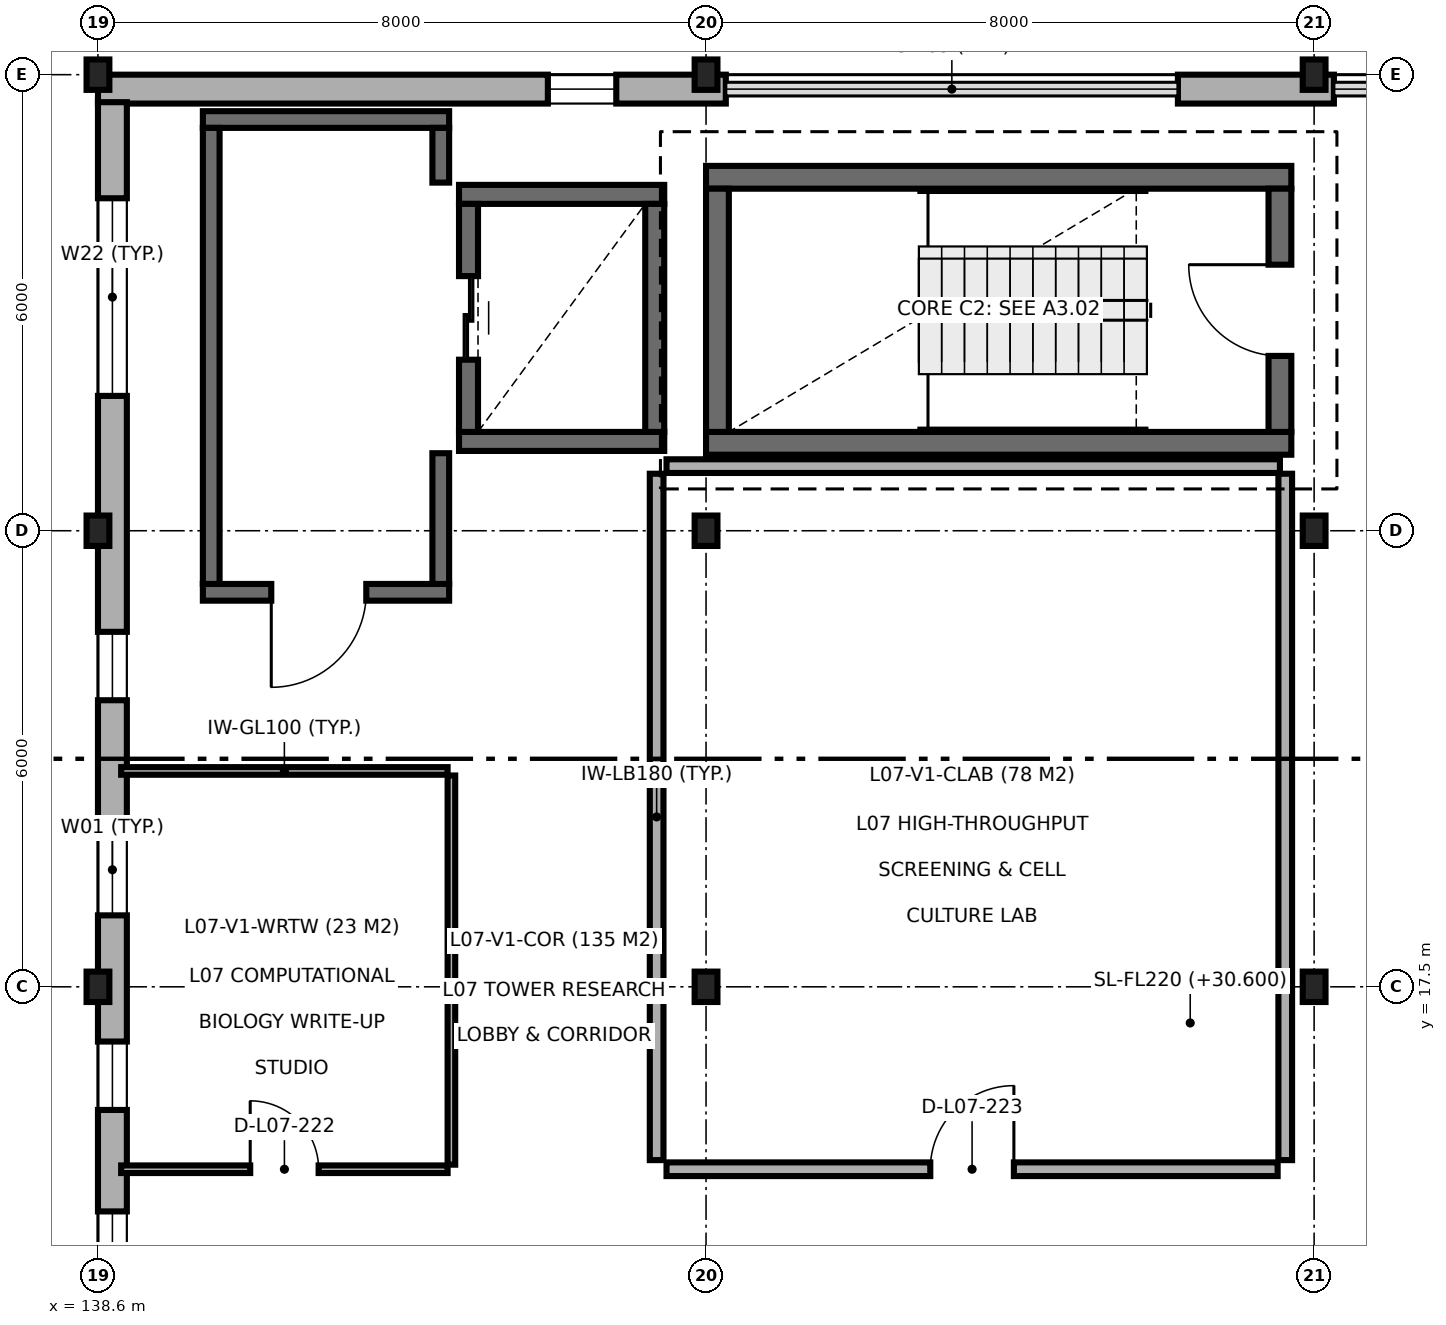
"""IFC4 building model, lengths in metres.
Left out: names, types, materials, properties, quantities, classifications, styles, units other than length and angle.
Written with IfcOpenShell. Run it as: python <this file> out.ifc"""

import sys

from ifc_helpers import new_model, si_unit, direction, frame, frame_2d, origin, origin_2d, place, context, subcontext, project, spatial, rectangle, i_section, extrude, element, fill, save


model = new_model("IFC4")
c1 = context("Model", 3, precision=1e-05, world=origin(), true_north=direction((0.0, 1.0)))
c2 = subcontext(c1, "Body", "Model", "MODEL_VIEW")
j1 = project(units=[si_unit("LENGTHUNIT", "METRE"), si_unit("PLANEANGLEUNIT", "RADIAN")], contexts=[c1])
p1 = place(None, origin())
s1 = spatial("IfcSite", under=j1, at=p1, CompositionType="ELEMENT")
p2 = place(p1, origin())
s2 = spatial("IfcBuilding", under=s1, at=p2, CompositionType="ELEMENT")
p3 = place(p2, frame((0.0, 0.0, 30.6)))
s3 = spatial("IfcBuildingStorey", under=s2, at=p3, CompositionType="ELEMENT", Elevation=30.6)
for number, where, z_axis, x_axis in (
    (1, (138.6, 17.5, 0.0), (0.0, 0.0, 1.0), (1.0, 0.0, 0.0)),
    (2, (138.6, 23.5, 0.0), (0.0, 0.0, 1.0), (1.0, 0.0, 0.0)),
    (3, (138.6, 29.5, 0.0), (0.0, 0.0, 1.0), (1.0, 0.0, 0.0)),
    (4, (146.6, 17.5, 0.0), (0.0, 0.0, 1.0), (1.0, 0.0, 0.0)),
    (5, (146.6, 23.5, 0.0), (0.0, 0.0, 1.0), (1.0, 0.0, 0.0)),
    (6, (146.6, 29.5, 0.0), (0.0, 0.0, 1.0), (1.0, 0.0, 0.0)),
    (7, (154.6, 17.5, 0.0), (0.0, 0.0, 1.0), (1.0, 0.0, 0.0)),
    (8, (154.6, 23.5, 0.0), (0.0, 0.0, 1.0), (1.0, 0.0, 0.0)),
    (9, (154.6, 29.5, 0.0), (0.0, 0.0, 1.0), (1.0, 0.0, 0.0)),
):
    element("IfcColumn", number, at=place(p3, frame(where, z_axis=z_axis, x_axis=x_axis)), inside=s3, PredefinedType="COLUMN", context=c2, shape_type="SweptSolid", body=[
        extrude(i_section(OverallWidth=0.3, OverallDepth=0.4, WebThickness=0.013, FlangeThickness=0.024, FilletRadius=0.027, at=origin_2d()), origin(), (0.0, 0.0, 1.0), 3.9),
    ])
for number, where, z_axis, x_axis in (
    (10, (146.6, 24.65, 0.0), (0.0, 0.0, 1.0), (1.0, 0.0, 0.0)),
    (11, (154.3, 28.15, 0.0), (0.0, 0.0, 1.0), (-1.0, 0.0, 0.0)),
):
    element("IfcWall", number, at=place(p3, frame(where, z_axis=z_axis, x_axis=x_axis)), inside=s3, PredefinedType="SHEAR", context=c2, shape_type="SweptSolid", body=[
        extrude(rectangle(XDim=7.7, YDim=0.3, at=frame_2d((3.85, 0.0))), origin(), (0.0, 0.0, 1.0), 3.9),
    ])
p4 = place(p3, frame((146.75, 28.0, 0.0), z_axis=(0.0, 0.0, 1.0), x_axis=(0.0, -1.0, 0.0)))
e12 = element("IfcWall", 12, at=p4, inside=s3, PredefinedType="SHEAR", context=c2, shape_type="SweptSolid", body=[
    extrude(rectangle(XDim=3.2, YDim=0.3, at=frame_2d((1.6, 0.0))), origin(), (0.0, 0.0, 1.0), 3.9),
])
p5 = place(p3, frame((154.15, 24.8, 0.0), z_axis=(0.0, 0.0, 1.0), x_axis=(0.0, 1.0, 0.0)))
e13 = element("IfcWall", 13, at=p5, inside=s3, PredefinedType="SHEAR", context=c2, shape_type="SweptSolid", body=[
    extrude(rectangle(XDim=3.2, YDim=0.3, at=frame_2d((1.6, 0.0))), origin(), (0.0, 0.0, 1.0), 3.9),
])
p6 = place(p5, frame((1.0, 0.0, 0.0)))
e14 = element("IfcOpeningElement", 14, at=p6, cuts=e13, PredefinedType="OPENING", context=c2, shape_type="SweptSolid", body=[
    extrude(rectangle(XDim=1.2, YDim=2.15, at=frame_2d((0.6, 1.075))), frame((0.0, 0.16, 0.0), z_axis=(0.0, -1.0, 0.0), x_axis=(1.0, 0.0, 0.0)), (0.0, 0.0, 1.0), 0.32),
])
for number, where, z_axis, x_axis in (
    (15, (143.35, 24.675, 0.0), (0.0, 0.0, 1.0), (1.0, 0.0, 0.0)),
    (16, (146.05, 27.925, 0.0), (0.0, 0.0, 1.0), (-1.0, 0.0, 0.0)),
):
    element("IfcWall", number, at=place(p3, frame(where, z_axis=z_axis, x_axis=x_axis)), inside=s3, PredefinedType="SHEAR", context=c2, shape_type="SweptSolid", body=[
        extrude(rectangle(XDim=2.7, YDim=0.25, at=frame_2d((1.35, 0.0))), origin(), (0.0, 0.0, 1.0), 3.9),
    ])
p7 = place(p3, frame((143.475, 27.8, 0.0), z_axis=(0.0, 0.0, 1.0), x_axis=(0.0, -1.0, 0.0)))
e17 = element("IfcWall", 17, at=p7, inside=s3, PredefinedType="SHEAR", context=c2, shape_type="SweptSolid", body=[
    extrude(rectangle(XDim=3.0, YDim=0.25, at=frame_2d((1.5, 0.0))), origin(), (0.0, 0.0, 1.0), 3.9),
])
p8 = place(p7, frame((0.95, 0.0, 0.0)))
e18 = element("IfcOpeningElement", 18, at=p8, cuts=e17, PredefinedType="OPENING", context=c2, shape_type="SweptSolid", body=[
    extrude(rectangle(XDim=1.1, YDim=2.15, at=frame_2d((0.55, 1.075))), frame((0.0, 0.135, 0.0), z_axis=(0.0, -1.0, 0.0), x_axis=(1.0, 0.0, 0.0)), (0.0, 0.0, 1.0), 0.27),
])
p9 = place(p3, frame((145.925, 24.8, 0.0), z_axis=(0.0, 0.0, 1.0), x_axis=(0.0, 1.0, 0.0)))
e19 = element("IfcWall", 19, at=p9, inside=s3, PredefinedType="SHEAR", context=c2, shape_type="SweptSolid", body=[
    extrude(rectangle(XDim=3.0, YDim=0.25, at=frame_2d((1.5, 0.0))), origin(), (0.0, 0.0, 1.0), 3.9),
])
p10 = place(p3, frame((139.98, 22.69, 0.0), z_axis=(0.0, 0.0, 1.0), x_axis=(1.0, 0.0, 0.0)))
e20 = element("IfcWall", 20, at=p10, inside=s3, PredefinedType="SOLIDWALL", context=c2, shape_type="SweptSolid", body=[
    extrude(rectangle(XDim=3.24, YDim=0.22, at=frame_2d((1.62, 0.0))), origin(), (0.0, 0.0, 1.0), 3.7),
])
p11 = place(p10, frame((0.9, 0.0, 0.0)))
e21 = element("IfcOpeningElement", 21, at=p11, cuts=e20, PredefinedType="OPENING", context=c2, shape_type="SweptSolid", body=[
    extrude(rectangle(XDim=1.25, YDim=2.15, at=frame_2d((0.625, 1.075))), frame((0.0, 0.12, 0.0), z_axis=(0.0, -1.0, 0.0), x_axis=(1.0, 0.0, 0.0)), (0.0, 0.0, 1.0), 0.24),
])
p12 = place(p3, frame((143.22, 28.91, 0.0), z_axis=(0.0, 0.0, 1.0), x_axis=(-1.0, 0.0, 0.0)))
e22 = element("IfcWall", 22, at=p12, inside=s3, PredefinedType="SOLIDWALL", context=c2, shape_type="SweptSolid", body=[
    extrude(rectangle(XDim=3.24, YDim=0.22, at=frame_2d((1.62, 0.0))), origin(), (0.0, 0.0, 1.0), 3.7),
])
p13 = place(p3, frame((140.09, 28.8, 0.0), z_axis=(0.0, 0.0, 1.0), x_axis=(0.0, -1.0, 0.0)))
e23 = element("IfcWall", 23, at=p13, inside=s3, PredefinedType="SOLIDWALL", context=c2, shape_type="SweptSolid", body=[
    extrude(rectangle(XDim=6.0, YDim=0.22, at=frame_2d((3.0, 0.0))), origin(), (0.0, 0.0, 1.0), 3.7),
])
p14 = place(p3, frame((143.11, 22.8, 0.0), z_axis=(0.0, 0.0, 1.0), x_axis=(0.0, 1.0, 0.0)))
e24 = element("IfcWall", 24, at=p14, inside=s3, PredefinedType="SOLIDWALL", context=c2, shape_type="SweptSolid", body=[
    extrude(rectangle(XDim=1.72, YDim=0.22, at=frame_2d((0.86, 0.0))), origin(), (0.0, 0.0, 1.0), 3.7),
])
p15 = place(p3, frame((143.11, 28.08, 0.0), z_axis=(0.0, 0.0, 1.0), x_axis=(0.0, 1.0, 0.0)))
e25 = element("IfcWall", 25, at=p15, inside=s3, PredefinedType="SOLIDWALL", context=c2, shape_type="SweptSolid", body=[
    extrude(rectangle(XDim=0.72, YDim=0.22, at=frame_2d((0.36, 0.0))), origin(), (0.0, 0.0, 1.0), 3.7),
])
p16 = place(p3, frame((154.86, 29.31, 0.0), z_axis=(0.0, 0.0, 1.0), x_axis=(-1.0, 0.0, 0.0)))
e26 = element("IfcWall", 26, at=p16, inside=s3, PredefinedType="SOLIDWALL", context=c2, shape_type="SweptSolid", body=[
    extrude(rectangle(XDim=2.052, YDim=0.38, at=frame_2d((1.026, 0.0))), origin(), (0.0, 0.0, 1.0), 3.7),
])
p17 = place(p3, frame((146.86, 29.31, 0.0), z_axis=(0.0, 0.0, 1.0), x_axis=(-1.0, 0.0, 0.0)))
e27 = element("IfcWall", 27, at=p17, inside=s3, PredefinedType="SOLIDWALL", context=c2, shape_type="SweptSolid", body=[
    extrude(rectangle(XDim=8.26, YDim=0.38, at=frame_2d((4.13, 0.0))), origin(), (0.0, 0.0, 1.0), 3.7),
])
p18 = place(p17, frame((1.441, 0.0, 0.9)))
e28 = element("IfcOpeningElement", 28, at=p18, cuts=e27, PredefinedType="OPENING", context=c2, shape_type="SweptSolid", body=[
    extrude(rectangle(XDim=0.9, YDim=1.8, at=frame_2d((0.45, 0.9))), frame((0.0, 0.2, 0.0), z_axis=(0.0, -1.0, 0.0), x_axis=(1.0, 0.0, 0.0)), (0.0, 0.0, 1.0), 0.4),
])
p19 = place(p3, frame((138.79, 29.138, 0.0), z_axis=(0.0, 0.0, 1.0), x_axis=(0.0, -1.0, 0.0)))
e29 = element("IfcWall", 29, at=p19, inside=s3, PredefinedType="SOLIDWALL", context=c2, shape_type="SweptSolid", body=[
    extrude(rectangle(XDim=24.238, YDim=0.38, at=frame_2d((12.119, 0.0))), origin(), (0.0, 0.0, 1.0), 3.7),
])
p20 = place(p19, frame((1.264, 0.0, 0.9)))
e30 = element("IfcOpeningElement", 30, at=p20, cuts=e29, PredefinedType="OPENING", context=c2, shape_type="SweptSolid", body=[
    extrude(rectangle(XDim=2.6, YDim=2.4, at=frame_2d((1.3, 1.2))), frame((0.0, 0.2, 0.0), z_axis=(0.0, -1.0, 0.0), x_axis=(1.0, 0.0, 0.0)), (0.0, 0.0, 1.0), 0.4),
])
p21 = place(p19, frame((6.968, 0.0, 0.9)))
e31 = element("IfcOpeningElement", 31, at=p21, cuts=e29, PredefinedType="OPENING", context=c2, shape_type="SweptSolid", body=[
    extrude(rectangle(XDim=0.9, YDim=1.8, at=frame_2d((0.45, 0.9))), frame((0.0, 0.2, 0.0), z_axis=(0.0, -1.0, 0.0), x_axis=(1.0, 0.0, 0.0)), (0.0, 0.0, 1.0), 0.4),
])
p22 = place(p19, frame((9.498, 0.0, 0.9)))
e32 = element("IfcOpeningElement", 32, at=p22, cuts=e29, PredefinedType="OPENING", context=c2, shape_type="SweptSolid", body=[
    extrude(rectangle(XDim=1.2, YDim=1.8, at=frame_2d((0.6, 0.9))), frame((0.0, 0.2, 0.0), z_axis=(0.0, -1.0, 0.0), x_axis=(1.0, 0.0, 0.0)), (0.0, 0.0, 1.0), 0.4),
])
p23 = place(p19, frame((12.358, 0.0, 0.9)))
e33 = element("IfcOpeningElement", 33, at=p23, cuts=e29, PredefinedType="OPENING", context=c2, shape_type="SweptSolid", body=[
    extrude(rectangle(XDim=0.9, YDim=1.8, at=frame_2d((0.45, 0.9))), frame((0.0, 0.2, 0.0), z_axis=(0.0, -1.0, 0.0), x_axis=(1.0, 0.0, 0.0)), (0.0, 0.0, 1.0), 0.4),
])
p24 = place(p19, frame((14.593, 0.0, 0.9)))
e34 = element("IfcOpeningElement", 34, at=p24, cuts=e29, PredefinedType="OPENING", context=c2, shape_type="SweptSolid", body=[
    extrude(rectangle(XDim=2.25, YDim=1.95, at=frame_2d((1.125, 0.975))), frame((0.0, 0.2, 0.0), z_axis=(0.0, -1.0, 0.0), x_axis=(1.0, 0.0, 0.0)), (0.0, 0.0, 1.0), 0.4),
])
p25 = place(p19, frame((19.203, 0.0, 0.9)))
e35 = element("IfcOpeningElement", 35, at=p25, cuts=e29, PredefinedType="OPENING", context=c2, shape_type="SweptSolid", body=[
    extrude(rectangle(XDim=2.85, YDim=1.95, at=frame_2d((1.425, 0.975))), frame((0.0, 0.2, 0.0), z_axis=(0.0, -1.0, 0.0), x_axis=(1.0, 0.0, 0.0)), (0.0, 0.0, 1.0), 0.4),
])
p26 = place(p3, frame((138.905, 20.34, 0.0), z_axis=(0.0, 0.0, 1.0), x_axis=(1.0, 0.0, 0.0)))
e36 = element("IfcWall", 36, at=p26, inside=s3, PredefinedType="PARTITIONING", context=c2, shape_type="SweptSolid", body=[
    extrude(rectangle(XDim=4.295, YDim=0.1, at=frame_2d((2.147, 0.0))), origin(), (0.0, 0.0, 1.0), 3.7),
])
p27 = place(p3, frame((143.25, 15.16, 0.0), z_axis=(0.0, 0.0, 1.0), x_axis=(0.0, 1.0, 0.0)))
e37 = element("IfcWall", 37, at=p27, inside=s3, PredefinedType="PARTITIONING", context=c2, shape_type="SweptSolid", body=[
    extrude(rectangle(XDim=5.12, YDim=0.1, at=frame_2d((2.56, 0.0))), origin(), (0.0, 0.0, 1.0), 3.7),
])
p28 = place(p3, frame((138.905, 15.1, 0.0), z_axis=(0.0, 0.0, 1.0), x_axis=(1.0, 0.0, 0.0)))
e38 = element("IfcWall", 38, at=p28, inside=s3, PredefinedType="PARTITIONING", context=c2, shape_type="SweptSolid", body=[
    extrude(rectangle(XDim=4.295, YDim=0.1, at=frame_2d((2.147, 0.0))), origin(), (0.0, 0.0, 1.0), 3.7),
])
p29 = place(p28, frame((1.698, 0.0, 0.0)))
e39 = element("IfcOpeningElement", 39, at=p29, cuts=e38, PredefinedType="OPENING", context=c2, shape_type="SweptSolid", body=[
    extrude(rectangle(XDim=0.9, YDim=2.1, at=frame_2d((0.45, 1.05))), frame((0.0, 0.06, 0.0), z_axis=(0.0, -1.0, 0.0), x_axis=(1.0, 0.0, 0.0)), (0.0, 0.0, 1.0), 0.12),
])
p30 = place(p3, frame((145.95, 15.22, 0.0), z_axis=(0.0, 0.0, 1.0), x_axis=(0.0, 1.0, 0.0)))
e40 = element("IfcWall", 40, at=p30, inside=s3, PredefinedType="PARTITIONING", context=c2, shape_type="SweptSolid", body=[
    extrude(rectangle(XDim=9.03, YDim=0.18, at=frame_2d((4.515, 0.0))), origin(), (0.0, 0.0, 1.0), 3.7),
])
p31 = place(p3, frame((146.08, 24.35, 0.0), z_axis=(0.0, 0.0, 1.0), x_axis=(1.0, 0.0, 0.0)))
e41 = element("IfcWall", 41, at=p31, inside=s3, PredefinedType="PARTITIONING", context=c2, shape_type="SweptSolid", body=[
    extrude(rectangle(XDim=8.07, YDim=0.18, at=frame_2d((4.035, 0.0))), origin(), (0.0, 0.0, 1.0), 2.83),
])
p32 = place(p3, frame((154.22, 15.22, 0.0), z_axis=(0.0, 0.0, 1.0), x_axis=(0.0, 1.0, 0.0)))
e42 = element("IfcWall", 42, at=p32, inside=s3, PredefinedType="PARTITIONING", context=c2, shape_type="SweptSolid", body=[
    extrude(rectangle(XDim=9.03, YDim=0.18, at=frame_2d((4.515, 0.0))), origin(), (0.0, 0.0, 1.0), 3.7),
])
p33 = place(p3, frame((146.08, 15.1, 0.0), z_axis=(0.0, 0.0, 1.0), x_axis=(1.0, 0.0, 0.0)))
e43 = element("IfcWall", 43, at=p33, inside=s3, PredefinedType="PARTITIONING", context=c2, shape_type="SweptSolid", body=[
    extrude(rectangle(XDim=8.04, YDim=0.18, at=frame_2d((4.02, 0.0))), origin(), (0.0, 0.0, 1.0), 3.7),
])
p34 = place(p33, frame((3.47, 0.0, 0.0)))
e44 = element("IfcOpeningElement", 44, at=p34, cuts=e43, PredefinedType="OPENING", context=c2, shape_type="SweptSolid", body=[
    extrude(rectangle(XDim=1.1, YDim=2.15, at=frame_2d((0.55, 1.075))), frame((0.0, 0.1, 0.0), z_axis=(0.0, -1.0, 0.0), x_axis=(1.0, 0.0, 0.0)), (0.0, 0.0, 1.0), 0.2),
])
p35 = place(p6, origin())
e45 = element("IfcDoor", 45, at=p35, inside=s3, OperationType="SINGLE_SWING_RIGHT", PredefinedType="DOOR", context=c2, shape_type="SweptSolid", body=[
    extrude(rectangle(XDim=1.2, YDim=2.15, at=frame_2d((0.6, 1.075))), frame((0.0, 0.025, 0.0), z_axis=(0.0, -1.0, 0.0), x_axis=(1.0, 0.0, 0.0)), (0.0, 0.0, 1.0), 0.05),
])
fill(e14, e45)
p36 = place(p8, origin())
e46 = element("IfcDoor", 46, at=p36, inside=s3, OperationType="DOUBLE_DOOR_SLIDING", PredefinedType="DOOR", context=c2, shape_type="SweptSolid", body=[
    extrude(rectangle(XDim=1.1, YDim=2.15, at=frame_2d((0.55, 1.075))), frame((0.0, 0.025, 0.0), z_axis=(0.0, -1.0, 0.0), x_axis=(1.0, 0.0, 0.0)), (0.0, 0.0, 1.0), 0.05),
])
fill(e18, e46)
p37 = place(p11, frame((1.25, 0.0, 0.0), z_axis=(0.0, 0.0, 1.0), x_axis=(-1.0, 0.0, 0.0)))
e47 = element("IfcDoor", 47, at=p37, inside=s3, OperationType="SINGLE_SWING_LEFT", PredefinedType="DOOR", context=c2, shape_type="SweptSolid", body=[
    extrude(rectangle(XDim=1.25, YDim=2.15, at=frame_2d((0.625, 1.075))), frame((0.0, 0.025, 0.0), z_axis=(0.0, -1.0, 0.0), x_axis=(1.0, 0.0, 0.0)), (0.0, 0.0, 1.0), 0.05),
])
fill(e21, e47)
p38 = place(p18, origin())
e48 = element("IfcWindow", 48, at=p38, inside=s3, PartitioningType="SINGLE_PANEL", PredefinedType="WINDOW", context=c2, shape_type="SweptSolid", body=[
    extrude(rectangle(XDim=0.9, YDim=1.8, at=frame_2d((0.45, 0.9))), frame((0.0, 0.03, 0.0), z_axis=(0.0, -1.0, 0.0), x_axis=(1.0, 0.0, 0.0)), (0.0, 0.0, 1.0), 0.06),
])
fill(e28, e48)
p39 = place(p20, origin())
e49 = element("IfcWindow", 49, at=p39, inside=s3, PartitioningType="SINGLE_PANEL", PredefinedType="WINDOW", context=c2, shape_type="SweptSolid", body=[
    extrude(rectangle(XDim=2.6, YDim=2.4, at=frame_2d((1.3, 1.2))), frame((0.0, 0.03, 0.0), z_axis=(0.0, -1.0, 0.0), x_axis=(1.0, 0.0, 0.0)), (0.0, 0.0, 1.0), 0.06),
])
fill(e30, e49)
p40 = place(p21, origin())
e50 = element("IfcWindow", 50, at=p40, inside=s3, PartitioningType="SINGLE_PANEL", PredefinedType="WINDOW", context=c2, shape_type="SweptSolid", body=[
    extrude(rectangle(XDim=0.9, YDim=1.8, at=frame_2d((0.45, 0.9))), frame((0.0, 0.03, 0.0), z_axis=(0.0, -1.0, 0.0), x_axis=(1.0, 0.0, 0.0)), (0.0, 0.0, 1.0), 0.06),
])
fill(e31, e50)
p41 = place(p22, origin())
e51 = element("IfcWindow", 51, at=p41, inside=s3, PartitioningType="SINGLE_PANEL", PredefinedType="WINDOW", context=c2, shape_type="SweptSolid", body=[
    extrude(rectangle(XDim=1.2, YDim=1.8, at=frame_2d((0.6, 0.9))), frame((0.0, 0.03, 0.0), z_axis=(0.0, -1.0, 0.0), x_axis=(1.0, 0.0, 0.0)), (0.0, 0.0, 1.0), 0.06),
])
fill(e32, e51)
p42 = place(p23, origin())
e52 = element("IfcWindow", 52, at=p42, inside=s3, PartitioningType="SINGLE_PANEL", PredefinedType="WINDOW", context=c2, shape_type="SweptSolid", body=[
    extrude(rectangle(XDim=0.9, YDim=1.8, at=frame_2d((0.45, 0.9))), frame((0.0, 0.03, 0.0), z_axis=(0.0, -1.0, 0.0), x_axis=(1.0, 0.0, 0.0)), (0.0, 0.0, 1.0), 0.06),
])
fill(e33, e52)
p43 = place(p24, origin())
e53 = element("IfcWindow", 53, at=p43, inside=s3, PartitioningType="SINGLE_PANEL", PredefinedType="WINDOW", context=c2, shape_type="SweptSolid", body=[
    extrude(rectangle(XDim=2.25, YDim=1.95, at=frame_2d((1.125, 0.975))), frame((0.0, 0.03, 0.0), z_axis=(0.0, -1.0, 0.0), x_axis=(1.0, 0.0, 0.0)), (0.0, 0.0, 1.0), 0.06),
])
fill(e34, e53)
p44 = place(p29, origin())
e54 = element("IfcDoor", 54, at=p44, inside=s3, OperationType="SINGLE_SWING_LEFT", PredefinedType="DOOR", context=c2, shape_type="SweptSolid", body=[
    extrude(rectangle(XDim=0.9, YDim=2.1, at=frame_2d((0.45, 1.05))), frame((0.0, 0.025, 0.0), z_axis=(0.0, -1.0, 0.0), x_axis=(1.0, 0.0, 0.0)), (0.0, 0.0, 1.0), 0.05),
])
fill(e39, e54)
p45 = place(p34, origin())
e55 = element("IfcDoor", 55, at=p45, inside=s3, OperationType="SINGLE_SWING_RIGHT", PredefinedType="DOOR", context=c2, shape_type="SweptSolid", body=[
    extrude(rectangle(XDim=1.1, YDim=2.15, at=frame_2d((0.55, 1.075))), frame((0.0, 0.025, 0.0), z_axis=(0.0, -1.0, 0.0), x_axis=(1.0, 0.0, 0.0)), (0.0, 0.0, 1.0), 0.05),
])
fill(e44, e55)
save(model, sys.argv[1])
